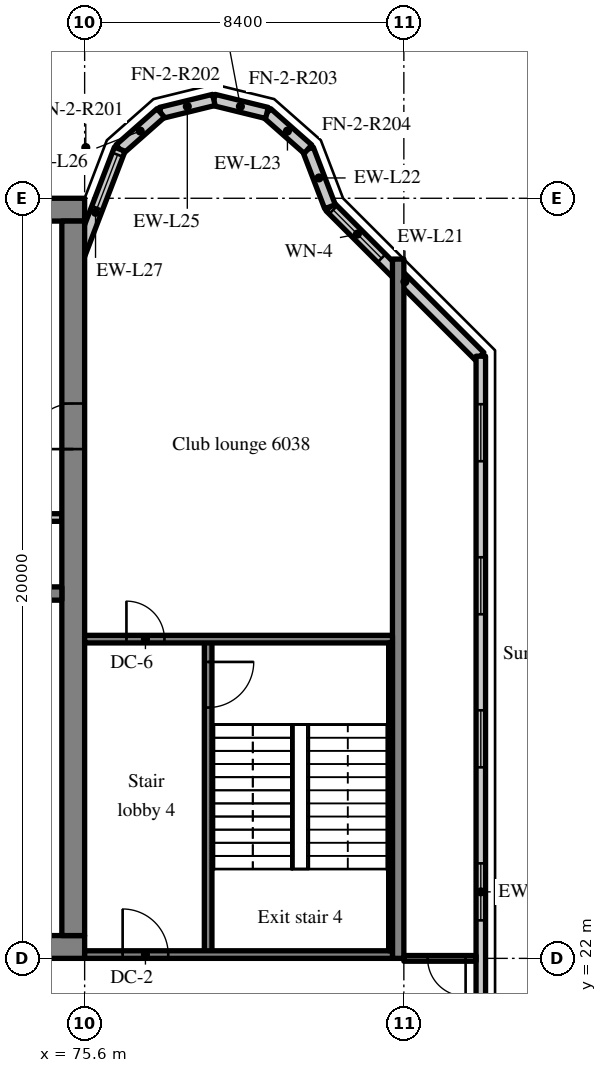
"""IFC4 building model, lengths in metres.
Left out: names, types, materials, properties, quantities, classifications, styles, units other than length and angle.
Written with IfcOpenShell. Run it as: python <this file> out.ifc"""

import sys

from ifc_helpers import new_model, si_unit, direction, frame, frame_2d, origin, place, context, subcontext, project, spatial, rectangle, extrude, source, transform, mapped, element, fill, save


model = new_model("IFC4")
c1 = context("Model", 3, precision=1e-05, world=origin(), true_north=direction((0.0, 1.0)))
c2 = subcontext(c1, "Body", "Model", "MODEL_VIEW")
j1 = project(units=[si_unit("LENGTHUNIT", "METRE"), si_unit("PLANEANGLEUNIT", "RADIAN")], contexts=[c1])
p1 = place(None, origin())
s1 = spatial("IfcSite", under=j1, at=p1, CompositionType="ELEMENT")
p2 = place(p1, origin())
s2 = spatial("IfcBuilding", under=s1, at=p2, CompositionType="ELEMENT")
p3 = place(p2, frame((0.0, 0.0, 249.1)))
s3 = spatial("IfcBuildingStorey", under=s2, at=p3, CompositionType="ELEMENT", Elevation=249.1)
m1 = source(origin(), c2, "Body", "SweptSolid", [
    extrude(rectangle(XDim=50.4, YDim=0.6, at=frame_2d((25.2, 0.0))), origin(), (0.0, 0.0, 1.0), 3.62),
])
p4 = place(p3, frame((25.2, 22.3, 0.0), z_axis=(0.0, 0.0, 1.0), x_axis=(1.0, 0.0, 0.0)))
e1 = element("IfcWall", 1, at=p4, inside=s3, PredefinedType="SHEAR", context=c2, shape_type="MappedRepresentation", body=[
    mapped(m1, transform((0.0, 0.0, 0.0), scale=1.0)),
])
m2 = source(origin(), c2, "Body", "SweptSolid", [
    extrude(rectangle(XDim=1.8, YDim=2.1, at=frame_2d((0.9, 1.05))), frame((0.0, 0.31, 0.0), z_axis=(0.0, -1.0, 0.0), x_axis=(1.0, 0.0, 0.0)), (0.0, 0.0, 1.0), 0.62),
])
p5 = place(p4, frame((15.9, 0.0, 0.0)))
e2 = element("IfcOpeningElement", 2, at=p5, cuts=e1, PredefinedType="OPENING", context=c2, shape_type="MappedRepresentation", body=[
    mapped(m2, transform((0.0, 0.0, 0.0), scale=1.0)),
])
m3 = source(origin(), c2, "Body", "SweptSolid", [
    extrude(rectangle(XDim=0.9, YDim=2.1, at=frame_2d((0.45, 1.05))), frame((0.0, 0.31, 0.0), z_axis=(0.0, -1.0, 0.0), x_axis=(1.0, 0.0, 0.0)), (0.0, 0.0, 1.0), 0.62),
])
p6 = place(p4, frame((21.513, 0.0, 0.0)))
e3 = element("IfcOpeningElement", 3, at=p6, cuts=e1, PredefinedType="OPENING", context=c2, shape_type="MappedRepresentation", body=[
    mapped(m3, transform((0.0, 0.0, 0.0), scale=1.0)),
])
p7 = place(p4, frame((32.7, 0.0, 0.0)))
e4 = element("IfcOpeningElement", 4, at=p7, cuts=e1, PredefinedType="OPENING", context=c2, shape_type="MappedRepresentation", body=[
    mapped(m2, transform((0.0, 0.0, 0.0), scale=1.0)),
])
m4 = source(origin(), c2, "Body", "SweptSolid", [
    extrude(rectangle(XDim=1.2, YDim=2.1, at=frame_2d((0.6, 1.05))), frame((0.0, 0.31, 0.0), z_axis=(0.0, -1.0, 0.0), x_axis=(1.0, 0.0, 0.0)), (0.0, 0.0, 1.0), 0.62),
])
p8 = place(p4, frame((6.488, 0.0, 0.0)))
e5 = element("IfcOpeningElement", 5, at=p8, cuts=e1, PredefinedType="OPENING", context=c2, shape_type="MappedRepresentation", body=[
    mapped(m4, transform((0.0, 0.0, 0.0), scale=1.0)),
])
p9 = place(p4, frame((47.925, 0.0, 0.0)))
e6 = element("IfcOpeningElement", 6, at=p9, cuts=e1, PredefinedType="OPENING", context=c2, shape_type="MappedRepresentation", body=[
    mapped(m4, transform((0.0, 0.0, 0.0), scale=1.0)),
])
p10 = place(p3, frame((25.2, 41.7, 0.0), z_axis=(0.0, 0.0, 1.0), x_axis=(1.0, 0.0, 0.0)))
e7 = element("IfcWall", 7, at=p10, inside=s3, PredefinedType="SHEAR", context=c2, shape_type="MappedRepresentation", body=[
    mapped(m1, transform((0.0, 0.0, 0.0), scale=1.0)),
])
m5 = source(origin(), c2, "Body", "SweptSolid", [
    extrude(rectangle(XDim=18.8, YDim=0.6, at=frame_2d((9.4, 0.0))), origin(), (0.0, 0.0, 1.0), 3.62),
])
p11 = place(p3, frame((75.3, 22.6, 0.0), z_axis=(0.0, 0.0, 1.0), x_axis=(0.0, 1.0, 0.0)))
e8 = element("IfcWall", 8, at=p11, inside=s3, PredefinedType="SHEAR", context=c2, shape_type="MappedRepresentation", body=[
    mapped(m5, transform((0.0, 0.0, 0.0), scale=1.0)),
])
p12 = place(p11, frame((12.8, 0.0, 0.0)))
e9 = element("IfcOpeningElement", 9, at=p12, cuts=e8, PredefinedType="OPENING", context=c2, shape_type="MappedRepresentation", body=[
    mapped(m4, transform((0.0, 0.0, 0.0), scale=1.0)),
])
m6 = source(origin(), c2, "Body", "SweptSolid", [
    extrude(rectangle(XDim=7.625, YDim=0.35, at=frame_2d((3.812, 0.0))), origin(), (0.0, 0.0, 1.0), 3.62),
])
p13 = place(p3, frame((67.375, 31.6, 0.0), z_axis=(0.0, 0.0, 1.0), x_axis=(1.0, 0.0, 0.0)))
e10 = element("IfcWall", 10, at=p13, inside=s3, PredefinedType="SHEAR", context=c2, shape_type="MappedRepresentation", body=[
    mapped(m6, transform((0.0, 0.0, 0.0), scale=1.0)),
])
m7 = source(origin(), c2, "Body", "SweptSolid", [
    extrude(rectangle(XDim=1.1, YDim=2.1, at=frame_2d((0.55, 1.05))), frame((0.0, 0.185, 0.0), z_axis=(0.0, -1.0, 0.0), x_axis=(1.0, 0.0, 0.0)), (0.0, 0.0, 1.0), 0.37),
])
p14 = place(p13, frame((5.8, 0.0, 0.0)))
e11 = element("IfcOpeningElement", 11, at=p14, cuts=e10, PredefinedType="OPENING", context=c2, shape_type="MappedRepresentation", body=[
    mapped(m7, transform((0.0, 0.0, 0.0), scale=1.0)),
])
m8 = source(origin(), c2, "Body", "SweptSolid", [
    extrude(rectangle(XDim=18.4, YDim=0.3, at=frame_2d((9.2, 0.0))), origin(), (0.0, 0.0, 1.0), 3.62),
])
p15 = place(p3, frame((83.85, 22.0, 0.0), z_axis=(0.0, 0.0, 1.0), x_axis=(0.0, 1.0, 0.0)))
e12 = element("IfcWall", 12, at=p15, inside=s3, PredefinedType="SHEAR", context=c2, shape_type="MappedRepresentation", body=[
    mapped(m8, transform((0.0, 0.0, 0.0), scale=1.0)),
])
m9 = source(origin(), c2, "Body", "SweptSolid", [
    extrude(rectangle(XDim=5.576, YDim=0.3, at=frame_2d((2.788, 0.0))), origin(), (0.0, 0.0, 1.0), 3.62),
])
p16 = place(p3, frame((86.0, 37.834, 0.0), z_axis=(0.0, 0.0, 1.0), x_axis=(-0.707106781187, 0.707106781187, 0.0)))
e13 = element("IfcWall", 13, at=p16, inside=s3, PredefinedType="SOLIDWALL", context=c2, shape_type="MappedRepresentation", body=[
    mapped(m9, transform((0.0, 0.0, 0.0), scale=1.0)),
])
m10 = source(origin(), c2, "Body", "SweptSolid", [
    extrude(rectangle(XDim=1.8, YDim=1.5, at=frame_2d((0.9, 0.75))), frame((0.0, 0.16, 0.0), z_axis=(0.0, -1.0, 0.0), x_axis=(1.0, 0.0, 0.0)), (0.0, 0.0, 1.0), 0.32),
])
p17 = place(p16, frame((3.658, 0.0, 0.9)))
e14 = element("IfcOpeningElement", 14, at=p17, cuts=e13, PredefinedType="OPENING", context=c2, shape_type="MappedRepresentation", body=[
    mapped(m10, transform((0.0, 0.0, 0.0), scale=1.0)),
])
m11 = source(origin(), c2, "Body", "SweptSolid", [
    extrude(rectangle(XDim=1.622, YDim=0.3, at=frame_2d((0.811, 0.0))), origin(), (0.0, 0.0, 1.0), 3.62),
])
p18 = place(p3, frame((82.057, 41.777, 0.0), z_axis=(0.0, 0.0, 1.0), x_axis=(-0.357778527068, 0.933806471154, 0.0)))
e15 = element("IfcWall", 15, at=p18, inside=s3, PredefinedType="SOLIDWALL", context=c2, shape_type="MappedRepresentation", body=[
    mapped(m11, transform((0.0, 0.0, 0.0), scale=1.0)),
])
m12 = source(origin(), c2, "Body", "SweptSolid", [
    extrude(rectangle(XDim=1.44, YDim=0.3, at=frame_2d((0.72, 0.0))), origin(), (0.0, 0.0, 1.0), 3.62),
])
p19 = place(p3, frame((81.477, 43.292, 0.0), z_axis=(0.0, 0.0, 1.0), x_axis=(-0.74957555648, 0.661918790432, 0.0)))
e16 = element("IfcWall", 16, at=p19, inside=s3, PredefinedType="SOLIDWALL", context=c2, shape_type="MappedRepresentation", body=[
    mapped(m12, transform((0.0, 0.0, 0.0), scale=1.0)),
])
m13 = source(origin(), c2, "Body", "SweptSolid", [
    extrude(rectangle(XDim=1.439, YDim=0.3, at=frame_2d((0.719, 0.0))), origin(), (0.0, 0.0, 1.0), 3.62),
])
for number, where, z_axis, x_axis in (
    (17, (80.397, 44.245, 0.0), (0.0, 0.0, 1.0), (-0.971, 0.238, 0.0)),
    (18, (79.0, 44.588, 0.0), (0.0, 0.0, 1.0), (-0.971, -0.238, 0.0)),
):
    element("IfcWall", number, at=place(p3, frame(where, z_axis=z_axis, x_axis=x_axis)), inside=s3, PredefinedType="SOLIDWALL", context=c2, shape_type="MappedRepresentation", body=[
        mapped(m13, transform((0.0, 0.0, 0.0), scale=1.0)),
    ])
p20 = place(p3, frame((77.603, 44.245, 0.0), z_axis=(0.0, 0.0, 1.0), x_axis=(-0.74957555648, -0.661918790432, 0.0)))
e19 = element("IfcWall", 19, at=p20, inside=s3, PredefinedType="SOLIDWALL", context=c2, shape_type="MappedRepresentation", body=[
    mapped(m12, transform((0.0, 0.0, 0.0), scale=1.0)),
])
m14 = source(origin(), c2, "Body", "SweptSolid", [
    extrude(rectangle(XDim=3.559, YDim=0.3, at=frame_2d((1.78, 0.0))), origin(), (0.0, 0.0, 1.0), 3.62),
])
p21 = place(p3, frame((76.523, 43.292, 0.0), z_axis=(0.0, 0.0, 1.0), x_axis=(-0.35779745313, -0.933799219604, 0.0)))
e20 = element("IfcWall", 20, at=p21, inside=s3, PredefinedType="SOLIDWALL", context=c2, shape_type="MappedRepresentation", body=[
    mapped(m14, transform((0.0, 0.0, 0.0), scale=1.0)),
])
m15 = source(origin(), c2, "Body", "SweptSolid", [
    extrude(rectangle(XDim=1.5, YDim=2.0, at=frame_2d((0.75, 1.0))), frame((0.0, 0.16, 0.0), z_axis=(0.0, -1.0, 0.0), x_axis=(1.0, 0.0, 0.0)), (0.0, 0.0, 1.0), 0.32),
])
p22 = place(p21, frame((0.156, 0.0, 0.9)))
e21 = element("IfcOpeningElement", 21, at=p22, cuts=e20, PredefinedType="OPENING", context=c2, shape_type="MappedRepresentation", body=[
    mapped(m15, transform((0.0, 0.0, 0.0), scale=1.0)),
])
m16 = source(origin(), c2, "Body", "SweptSolid", [
    extrude(rectangle(XDim=28.189, YDim=0.25, at=frame_2d((14.095, 0.0))), origin(), (0.0, 0.0, 1.0), 3.62),
])
p23 = place(p3, frame((86.025, 9.655, 0.0), z_axis=(0.0, 0.0, 1.0), x_axis=(0.0, 1.0, 0.0)))
e22 = element("IfcWall", 22, at=p23, inside=s3, PredefinedType="SOLIDWALL", context=c2, shape_type="MappedRepresentation", body=[
    mapped(m16, transform((0.0, 0.0, 0.0), scale=1.0)),
])
m17 = source(origin(), c2, "Body", "SweptSolid", [
    extrude(rectangle(XDim=1.5, YDim=1.5, at=frame_2d((0.75, 0.75))), frame((0.0, 0.135, 0.0), z_axis=(0.0, -1.0, 0.0), x_axis=(1.0, 0.0, 0.0)), (0.0, 0.0, 1.0), 0.27),
])
p24 = place(p23, frame((1.263, 0.0, 0.9)))
e23 = element("IfcOpeningElement", 23, at=p24, cuts=e22, PredefinedType="OPENING", context=c2, shape_type="MappedRepresentation", body=[
    mapped(m17, transform((0.0, 0.0, 0.0), scale=1.0)),
])
p25 = place(p23, frame((5.291, 0.0, 0.9)))
e24 = element("IfcOpeningElement", 24, at=p25, cuts=e22, PredefinedType="OPENING", context=c2, shape_type="MappedRepresentation", body=[
    mapped(m17, transform((0.0, 0.0, 0.0), scale=1.0)),
])
p26 = place(p23, frame((9.318, 0.0, 0.9)))
e25 = element("IfcOpeningElement", 25, at=p26, cuts=e22, PredefinedType="OPENING", context=c2, shape_type="MappedRepresentation", body=[
    mapped(m17, transform((0.0, 0.0, 0.0), scale=1.0)),
])
p27 = place(p23, frame((13.345, 0.0, 0.9)))
e26 = element("IfcOpeningElement", 26, at=p27, cuts=e22, PredefinedType="OPENING", context=c2, shape_type="MappedRepresentation", body=[
    mapped(m17, transform((0.0, 0.0, 0.0), scale=1.0)),
])
p28 = place(p23, frame((17.372, 0.0, 0.9)))
e27 = element("IfcOpeningElement", 27, at=p28, cuts=e22, PredefinedType="OPENING", context=c2, shape_type="MappedRepresentation", body=[
    mapped(m17, transform((0.0, 0.0, 0.0), scale=1.0)),
])
p29 = place(p23, frame((21.399, 0.0, 0.9)))
e28 = element("IfcOpeningElement", 28, at=p29, cuts=e22, PredefinedType="OPENING", context=c2, shape_type="MappedRepresentation", body=[
    mapped(m17, transform((0.0, 0.0, 0.0), scale=1.0)),
])
p30 = place(p23, frame((25.426, 0.0, 0.9)))
e29 = element("IfcOpeningElement", 29, at=p30, cuts=e22, PredefinedType="OPENING", context=c2, shape_type="MappedRepresentation", body=[
    mapped(m17, transform((0.0, 0.0, 0.0), scale=1.0)),
])
m18 = source(origin(), c2, "Body", "SweptSolid", [
    extrude(rectangle(XDim=2.55, YDim=0.2, at=frame_2d((1.275, 0.0))), origin(), (0.0, 0.0, 1.0), 3.62),
])
p31 = place(p3, frame((72.45, 33.6, 0.0), z_axis=(0.0, 0.0, 1.0), x_axis=(1.0, 0.0, 0.0)))
e30 = element("IfcWall", 30, at=p31, inside=s3, PredefinedType="SOLIDWALL", context=c2, shape_type="MappedRepresentation", body=[
    mapped(m18, transform((0.0, 0.0, 0.0), scale=1.0)),
])
m19 = source(origin(), c2, "Body", "SweptSolid", [
    extrude(rectangle(XDim=8.3, YDim=0.2, at=frame_2d((4.15, 0.0))), origin(), (0.0, 0.0, 1.0), 3.62),
])
p32 = place(p3, frame((78.85, 22.1, 0.0), z_axis=(0.0, 0.0, 1.0), x_axis=(0.0, 1.0, 0.0)))
e31 = element("IfcWall", 31, at=p32, inside=s3, PredefinedType="SOLIDWALL", context=c2, shape_type="MappedRepresentation", body=[
    mapped(m19, transform((0.0, 0.0, 0.0), scale=1.0)),
])
m20 = source(origin(), c2, "Body", "SweptSolid", [
    extrude(rectangle(XDim=1.2, YDim=2.1, at=frame_2d((0.6, 1.05))), frame((0.0, 0.11, 0.0), z_axis=(0.0, -1.0, 0.0), x_axis=(1.0, 0.0, 0.0)), (0.0, 0.0, 1.0), 0.22),
])
p33 = place(p32, frame((6.5, 0.0, 0.0)))
e32 = element("IfcOpeningElement", 32, at=p33, cuts=e31, PredefinedType="OPENING", context=c2, shape_type="MappedRepresentation", body=[
    mapped(m20, transform((0.0, 0.0, 0.0), scale=1.0)),
])
m21 = source(origin(), c2, "Body", "SweptSolid", [
    extrude(rectangle(XDim=8.1, YDim=0.2, at=frame_2d((4.05, 0.0))), origin(), (0.0, 0.0, 1.0), 3.62),
])
p34 = place(p3, frame((83.7, 22.1, 0.0), z_axis=(0.0, 0.0, 1.0), x_axis=(-1.0, 0.0, 0.0)))
e33 = element("IfcWall", 33, at=p34, inside=s3, PredefinedType="SOLIDWALL", context=c2, shape_type="MappedRepresentation", body=[
    mapped(m21, transform((0.0, 0.0, 0.0), scale=1.0)),
])
p35 = place(p34, frame((5.9, 0.0, 0.0)))
e34 = element("IfcOpeningElement", 34, at=p35, cuts=e33, PredefinedType="OPENING", context=c2, shape_type="MappedRepresentation", body=[
    mapped(m20, transform((0.0, 0.0, 0.0), scale=1.0)),
])
p36 = place(p3, frame((83.7, 30.4, 0.0), z_axis=(0.0, 0.0, 1.0), x_axis=(-1.0, 0.0, 0.0)))
e35 = element("IfcWall", 35, at=p36, inside=s3, PredefinedType="SOLIDWALL", context=c2, shape_type="MappedRepresentation", body=[
    mapped(m21, transform((0.0, 0.0, 0.0), scale=1.0)),
])
m22 = source(origin(), c2, "Body", "SweptSolid", [
    extrude(rectangle(XDim=1.0, YDim=2.1, at=frame_2d((0.5, 1.05))), frame((0.0, 0.11, 0.0), z_axis=(0.0, -1.0, 0.0), x_axis=(1.0, 0.0, 0.0)), (0.0, 0.0, 1.0), 0.22),
])
p37 = place(p36, frame((6.0, 0.0, 0.0)))
e36 = element("IfcOpeningElement", 36, at=p37, cuts=e35, PredefinedType="OPENING", context=c2, shape_type="MappedRepresentation", body=[
    mapped(m22, transform((0.0, 0.0, 0.0), scale=1.0)),
])
m23 = source(origin(), c2, "Body", "SweptSolid", [
    extrude(rectangle(XDim=8.1, YDim=0.1, at=frame_2d((4.05, 0.0))), origin(), (0.0, 0.0, 1.0), 3.62),
])
p38 = place(p3, frame((83.65, 22.2, 0.0), z_axis=(0.0, 0.0, 1.0), x_axis=(0.0, 1.0, 0.0)))
e37 = element("IfcWall", 37, at=p38, inside=s3, PredefinedType="SOLIDWALL", context=c2, shape_type="MappedRepresentation", body=[
    mapped(m23, transform((0.0, 0.0, 0.0), scale=1.0)),
])
m24 = source(origin(), c2, "Body", "SweptSolid", [
    extrude(rectangle(XDim=1.9, YDim=0.15, at=frame_2d((0.95, 0.0))), origin(), (0.0, 0.0, 1.0), 2.92),
])
p39 = place(p3, frame((84.0, 22.0, 0.0), z_axis=(0.0, 0.0, 1.0), x_axis=(1.0, 0.0, 0.0)))
e38 = element("IfcWall", 38, at=p39, inside=s3, PredefinedType="PARTITIONING", context=c2, shape_type="MappedRepresentation", body=[
    mapped(m24, transform((0.0, 0.0, 0.0), scale=1.0)),
])
m25 = source(origin(), c2, "Body", "SweptSolid", [
    extrude(rectangle(XDim=1.0, YDim=2.1, at=frame_2d((0.5, 1.05))), frame((0.0, 0.085, 0.0), z_axis=(0.0, -1.0, 0.0), x_axis=(1.0, 0.0, 0.0)), (0.0, 0.0, 1.0), 0.17),
])
p40 = place(p39, frame((0.625, 0.0, 0.0)))
e39 = element("IfcOpeningElement", 39, at=p40, cuts=e38, PredefinedType="OPENING", context=c2, shape_type="MappedRepresentation", body=[
    mapped(m25, transform((0.0, 0.0, 0.0), scale=1.0)),
])
m26 = source(origin(), c2, "Body", "SweptSolid", [
    extrude(rectangle(XDim=1.8, YDim=1.5, at=frame_2d((0.9, 0.75))), frame((0.0, 0.03, 0.0), z_axis=(0.0, -1.0, 0.0), x_axis=(1.0, 0.0, 0.0)), (0.0, 0.0, 1.0), 0.06),
])
p41 = place(p17, origin())
e40 = element("IfcWindow", 40, at=p41, inside=s3, PartitioningType="SINGLE_PANEL", PredefinedType="WINDOW", context=c2, shape_type="MappedRepresentation", body=[
    mapped(m26, transform((0.0, 0.0, 0.0), scale=1.0)),
])
fill(e14, e40)
m27 = source(origin(), c2, "Body", "SweptSolid", [
    extrude(rectangle(XDim=1.5, YDim=2.0, at=frame_2d((0.75, 1.0))), frame((0.0, 0.03, 0.0), z_axis=(0.0, -1.0, 0.0), x_axis=(1.0, 0.0, 0.0)), (0.0, 0.0, 1.0), 0.06),
])
p42 = place(p22, origin())
e41 = element("IfcWindow", 41, at=p42, inside=s3, PartitioningType="SINGLE_PANEL", PredefinedType="WINDOW", context=c2, shape_type="MappedRepresentation", body=[
    mapped(m27, transform((0.0, 0.0, 0.0), scale=1.0)),
])
fill(e21, e41)
m28 = source(origin(), c2, "Body", "SweptSolid", [
    extrude(rectangle(XDim=1.5, YDim=1.5, at=frame_2d((0.75, 0.75))), frame((0.0, 0.03, 0.0), z_axis=(0.0, -1.0, 0.0), x_axis=(1.0, 0.0, 0.0)), (0.0, 0.0, 1.0), 0.06),
])
p43 = place(p27, origin())
e42 = element("IfcWindow", 42, at=p43, inside=s3, PartitioningType="SINGLE_PANEL", PredefinedType="WINDOW", context=c2, shape_type="MappedRepresentation", body=[
    mapped(m28, transform((0.0, 0.0, 0.0), scale=1.0)),
])
fill(e26, e42)
p44 = place(p28, origin())
e43 = element("IfcWindow", 43, at=p44, inside=s3, PartitioningType="SINGLE_PANEL", PredefinedType="WINDOW", context=c2, shape_type="MappedRepresentation", body=[
    mapped(m28, transform((0.0, 0.0, 0.0), scale=1.0)),
])
fill(e27, e43)
p45 = place(p29, origin())
e44 = element("IfcWindow", 44, at=p45, inside=s3, PartitioningType="SINGLE_PANEL", PredefinedType="WINDOW", context=c2, shape_type="MappedRepresentation", body=[
    mapped(m28, transform((0.0, 0.0, 0.0), scale=1.0)),
])
fill(e28, e44)
p46 = place(p30, origin())
e45 = element("IfcWindow", 45, at=p46, inside=s3, PartitioningType="SINGLE_PANEL", PredefinedType="WINDOW", context=c2, shape_type="MappedRepresentation", body=[
    mapped(m28, transform((0.0, 0.0, 0.0), scale=1.0)),
])
fill(e29, e45)
m29 = source(origin(), c2, "Body", "SweptSolid", [
    extrude(rectangle(XDim=1.2, YDim=2.1, at=frame_2d((0.6, 1.05))), frame((0.0, 0.025, 0.0), z_axis=(0.0, -1.0, 0.0), x_axis=(1.0, 0.0, 0.0)), (0.0, 0.0, 1.0), 0.05),
])
p47 = place(p12, origin())
e46 = element("IfcDoor", 46, at=p47, inside=s3, OperationType="SINGLE_SWING_LEFT", PredefinedType="DOOR", context=c2, shape_type="MappedRepresentation", body=[
    mapped(m29, transform((0.0, 0.0, 0.0), scale=1.0)),
])
fill(e9, e46)
p48 = place(p33, origin())
e47 = element("IfcDoor", 47, at=p48, inside=s3, OperationType="SINGLE_SWING_RIGHT", PredefinedType="DOOR", context=c2, shape_type="MappedRepresentation", body=[
    mapped(m29, transform((0.0, 0.0, 0.0), scale=1.0)),
])
fill(e32, e47)
p49 = place(p35, origin())
e48 = element("IfcDoor", 48, at=p49, inside=s3, OperationType="SINGLE_SWING_RIGHT", PredefinedType="DOOR", context=c2, shape_type="MappedRepresentation", body=[
    mapped(m29, transform((0.0, 0.0, 0.0), scale=1.0)),
])
fill(e34, e48)
m30 = source(origin(), c2, "Body", "SweptSolid", [
    extrude(rectangle(XDim=1.0, YDim=2.1, at=frame_2d((0.5, 1.05))), frame((0.0, 0.025, 0.0), z_axis=(0.0, -1.0, 0.0), x_axis=(1.0, 0.0, 0.0)), (0.0, 0.0, 1.0), 0.05),
])
p50 = place(p37, origin())
e49 = element("IfcDoor", 49, at=p50, inside=s3, OperationType="SINGLE_SWING_RIGHT", PredefinedType="DOOR", context=c2, shape_type="MappedRepresentation", body=[
    mapped(m30, transform((0.0, 0.0, 0.0), scale=1.0)),
])
fill(e36, e49)
p51 = place(p40, origin())
e50 = element("IfcDoor", 50, at=p51, inside=s3, OperationType="SINGLE_SWING_RIGHT", PredefinedType="DOOR", context=c2, shape_type="MappedRepresentation", body=[
    mapped(m30, transform((0.0, 0.0, 0.0), scale=1.0)),
])
fill(e39, e50)
save(model, sys.argv[1])
